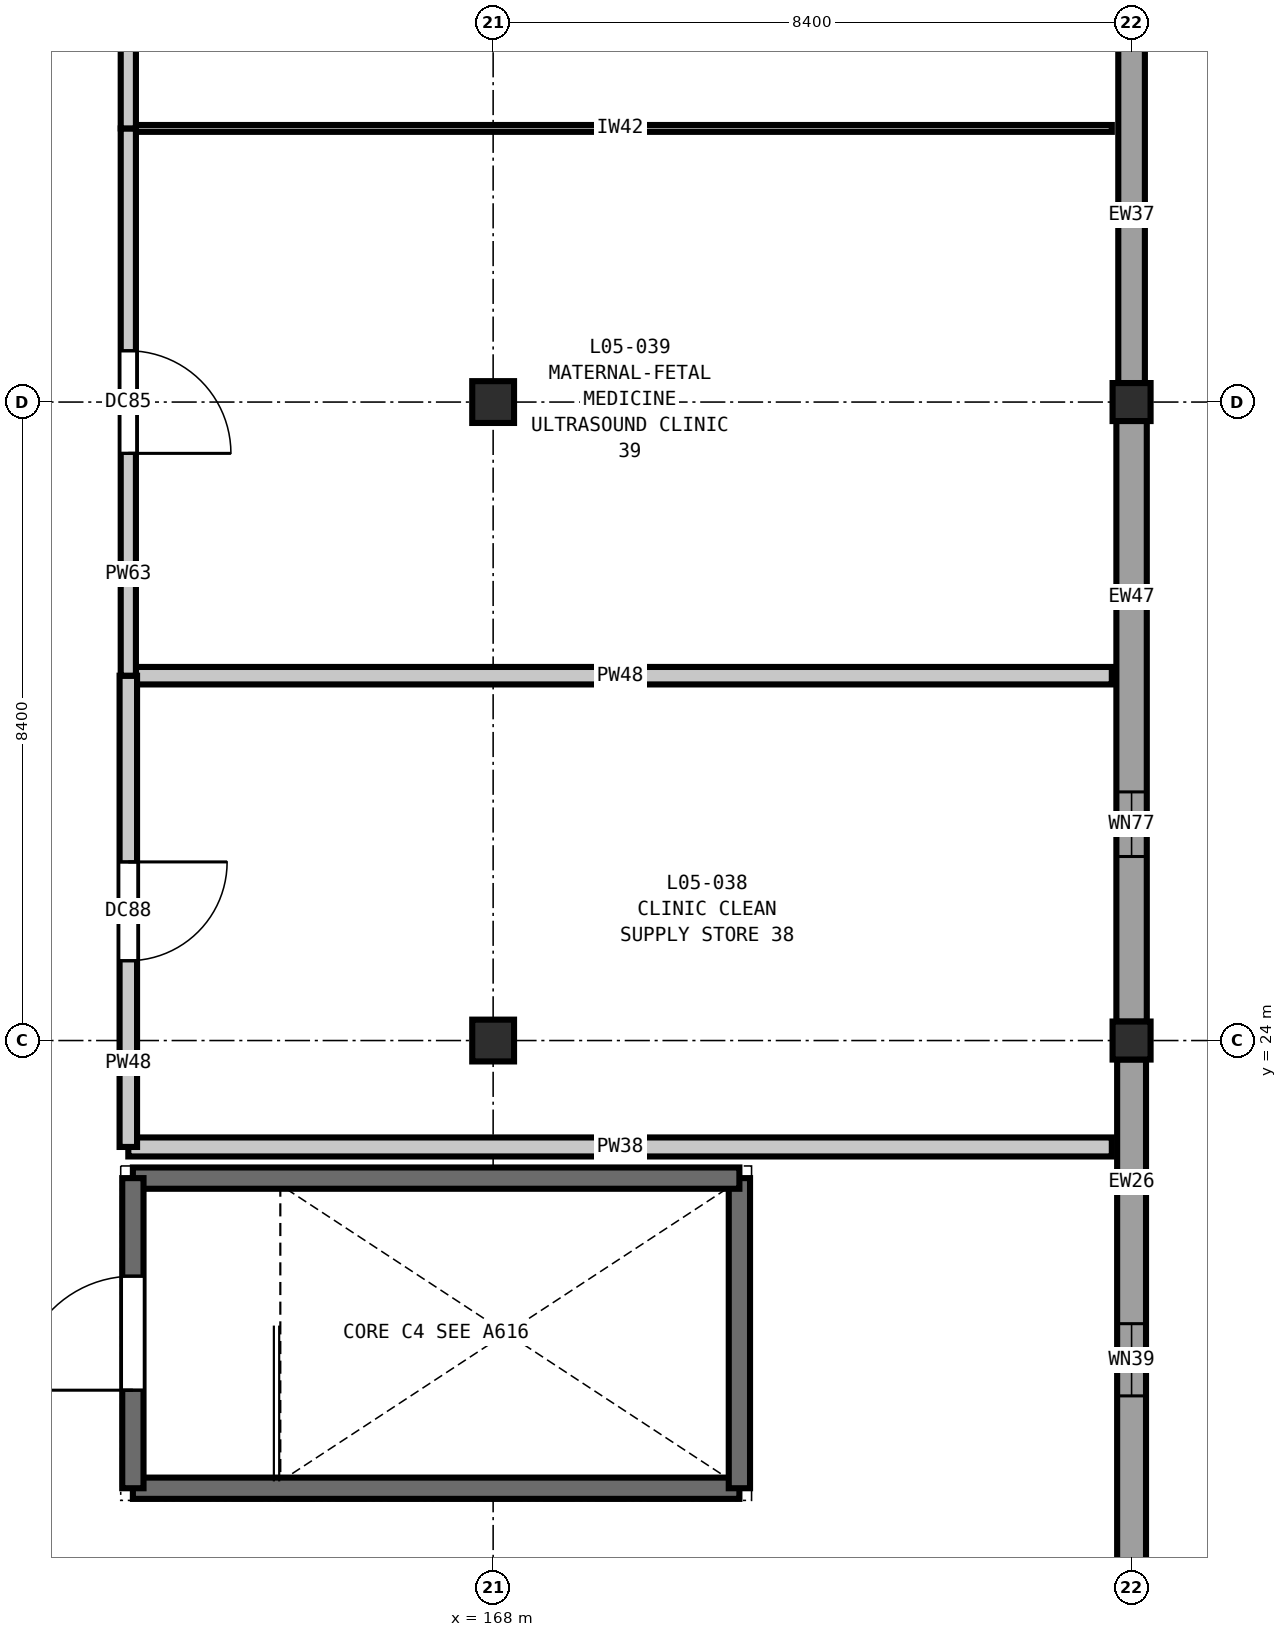
"""IFC4 building model, lengths in metres.
Left out: names, types, materials, properties, quantities, classifications, styles, units other than length and angle.
Written with IfcOpenShell. Run it as: python <this file> out.ifc"""

import sys

from ifc_helpers import new_model, si_unit, direction, frame, frame_2d, origin, origin_2d, place, context, subcontext, project, spatial, rectangle, extrude, element, fill, save


model = new_model("IFC4")
c1 = context("Model", 3, precision=1e-05, world=origin(), true_north=direction((0.0, 1.0)))
c2 = subcontext(c1, "Body", "Model", "MODEL_VIEW")
j1 = project(units=[si_unit("LENGTHUNIT", "METRE"), si_unit("PLANEANGLEUNIT", "RADIAN")], contexts=[c1])
p1 = place(None, origin())
s1 = spatial("IfcSite", under=j1, at=p1, CompositionType="ELEMENT")
p2 = place(p1, origin())
s2 = spatial("IfcBuilding", under=s1, at=p2, CompositionType="ELEMENT")
p3 = place(p2, frame((0.0, 0.0, 24.6)))
s3 = spatial("IfcBuildingStorey", under=s2, at=p3, CompositionType="ELEMENT", Elevation=24.6)
for number, where, z_axis, x_axis in (
    (1, (168.0, 24.0, 0.0), (0.0, 0.0, 1.0), (1.0, 0.0, 0.0)),
    (2, (168.0, 32.4, 0.0), (0.0, 0.0, 1.0), (1.0, 0.0, 0.0)),
):
    element("IfcColumn", number, at=place(p3, frame(where, z_axis=z_axis, x_axis=x_axis)), inside=s3, PredefinedType="COLUMN", context=c2, shape_type="SweptSolid", body=[
        extrude(rectangle(XDim=0.55, YDim=0.55, at=origin_2d()), origin(), (0.0, 0.0, 1.0), 4.2),
    ])
for number, where, z_axis, x_axis in (
    (3, (176.4, 24.0, 0.0), (0.0, 0.0, 1.0), (1.0, 0.0, 0.0)),
    (4, (176.4, 32.4, 0.0), (0.0, 0.0, 1.0), (1.0, 0.0, 0.0)),
):
    element("IfcColumn", number, at=place(p3, frame(where, z_axis=z_axis, x_axis=x_axis)), inside=s3, PredefinedType="COLUMN", context=c2, shape_type="SweptSolid", body=[
        extrude(rectangle(XDim=0.5, YDim=0.5, at=origin_2d()), origin(), (0.0, 0.0, 1.0), 4.2),
    ])
p4 = place(p3, frame((176.4, 40.552, 0.0), z_axis=(0.0, 0.0, 1.0), x_axis=(0.0, -1.0, 0.0)))
e5 = element("IfcWall", 5, at=p4, inside=s3, PredefinedType="SOLIDWALL", context=c2, shape_type="SweptSolid", body=[
    extrude(rectangle(XDim=7.904, YDim=0.35, at=frame_2d((3.952, 0.0))), origin(), (0.0, 0.0, 1.0), 3.48),
])
p5 = place(p4, frame((2.089, 0.0, 0.9)))
e6 = element("IfcOpeningElement", 6, at=p5, cuts=e5, PredefinedType="OPENING", context=c2, shape_type="SweptSolid", body=[
    extrude(rectangle(XDim=1.15, YDim=1.4, at=frame_2d((0.575, 0.7))), frame((0.0, 0.185, 0.0), z_axis=(0.0, -1.0, 0.0), x_axis=(1.0, 0.0, 0.0)), (0.0, 0.0, 1.0), 0.37),
])
p6 = place(p3, frame((176.4, 32.152, 0.0), z_axis=(0.0, 0.0, 1.0), x_axis=(0.0, -1.0, 0.0)))
e7 = element("IfcWall", 7, at=p6, inside=s3, PredefinedType="SOLIDWALL", context=c2, shape_type="SweptSolid", body=[
    extrude(rectangle(XDim=7.904, YDim=0.4, at=frame_2d((3.952, 0.0))), origin(), (0.0, 0.0, 1.0), 3.48),
])
p7 = place(p6, frame((4.881, 0.0, 0.9)))
e8 = element("IfcOpeningElement", 8, at=p7, cuts=e7, PredefinedType="OPENING", context=c2, shape_type="SweptSolid", body=[
    extrude(rectangle(XDim=0.85, YDim=1.4, at=frame_2d((0.425, 0.7))), frame((0.0, 0.21, 0.0), z_axis=(0.0, -1.0, 0.0), x_axis=(1.0, 0.0, 0.0)), (0.0, 0.0, 1.0), 0.42),
])
p8 = place(p3, frame((176.4, 23.752, 0.0), z_axis=(0.0, 0.0, 1.0), x_axis=(0.0, -1.0, 0.0)))
e9 = element("IfcWall", 9, at=p8, inside=s3, PredefinedType="SOLIDWALL", context=c2, shape_type="SweptSolid", body=[
    extrude(rectangle(XDim=7.904, YDim=0.38, at=frame_2d((3.952, 0.0))), origin(), (0.0, 0.0, 1.0), 3.48),
])
p9 = place(p8, frame((3.477, 0.0, 0.9)))
e10 = element("IfcOpeningElement", 10, at=p9, cuts=e9, PredefinedType="OPENING", context=c2, shape_type="SweptSolid", body=[
    extrude(rectangle(XDim=0.95, YDim=1.4, at=frame_2d((0.475, 0.7))), frame((0.0, 0.2, 0.0), z_axis=(0.0, -1.0, 0.0), x_axis=(1.0, 0.0, 0.0)), (0.0, 0.0, 1.0), 0.4),
])
p10 = place(p3, frame((163.26, 18.11, 0.0), z_axis=(0.0, 0.0, 1.0), x_axis=(1.0, 0.0, 0.0)))
e11 = element("IfcWall", 11, at=p10, inside=s3, PredefinedType="SHEAR", context=c2, shape_type="SweptSolid", body=[
    extrude(rectangle(XDim=7.98, YDim=0.28, at=frame_2d((3.99, 0.0))), origin(), (0.0, 0.0, 1.0), 4.2),
])
p11 = place(p3, frame((171.24, 18.11, 0.0), z_axis=(0.0, 0.0, 1.0), x_axis=(0.0, 1.0, 0.0)))
e12 = element("IfcWall", 12, at=p11, inside=s3, PredefinedType="SHEAR", context=c2, shape_type="SweptSolid", body=[
    extrude(rectangle(XDim=4.08, YDim=0.28, at=frame_2d((2.04, 0.0))), origin(), (0.0, 0.0, 1.0), 4.2),
])
p12 = place(p3, frame((171.24, 22.19, 0.0), z_axis=(0.0, 0.0, 1.0), x_axis=(-1.0, 0.0, 0.0)))
e13 = element("IfcWall", 13, at=p12, inside=s3, PredefinedType="SHEAR", context=c2, shape_type="SweptSolid", body=[
    extrude(rectangle(XDim=7.98, YDim=0.28, at=frame_2d((3.99, 0.0))), origin(), (0.0, 0.0, 1.0), 4.2),
])
p13 = place(p3, frame((163.26, 22.19, 0.0), z_axis=(0.0, 0.0, 1.0), x_axis=(0.0, -1.0, 0.0)))
e14 = element("IfcWall", 14, at=p13, inside=s3, PredefinedType="SHEAR", context=c2, shape_type="SweptSolid", body=[
    extrude(rectangle(XDim=4.08, YDim=0.28, at=frame_2d((2.04, 0.0))), origin(), (0.0, 0.0, 1.0), 4.2),
])
p14 = place(p13, frame((1.29, 0.0, 0.0)))
e15 = element("IfcOpeningElement", 15, at=p14, cuts=e14, PredefinedType="OPENING", context=c2, shape_type="SweptSolid", body=[
    extrude(rectangle(XDim=1.5, YDim=2.2, at=frame_2d((0.75, 1.1))), frame((0.0, 0.15, 0.0), z_axis=(0.0, -1.0, 0.0), x_axis=(1.0, 0.0, 0.0)), (0.0, 0.0, 1.0), 0.3),
])
p15 = place(p3, frame((163.2, 22.6, 0.0), z_axis=(0.0, 0.0, 1.0), x_axis=(1.0, 0.0, 0.0)))
e16 = element("IfcWall", 16, at=p15, inside=s3, PredefinedType="PARTITIONING", context=c2, shape_type="SweptSolid", body=[
    extrude(rectangle(XDim=12.94, YDim=0.25, at=frame_2d((6.47, 0.0))), origin(), (0.0, 0.0, 1.0), 3.92),
])
p16 = place(p3, frame((163.2, 28.8, 0.0), z_axis=(0.0, 0.0, 1.0), x_axis=(1.0, 0.0, 0.0)))
e17 = element("IfcWall", 17, at=p16, inside=s3, PredefinedType="PARTITIONING", context=c2, shape_type="SweptSolid", body=[
    extrude(rectangle(XDim=12.94, YDim=0.23, at=frame_2d((6.47, 0.0))), origin(), (0.0, 0.0, 1.0), 3.92),
])
p17 = place(p3, frame((163.2, 36.0, 0.0), z_axis=(0.0, 0.0, 1.0), x_axis=(1.0, 0.0, 0.0)))
e18 = element("IfcWall", 18, at=p17, inside=s3, PredefinedType="PARTITIONING", context=c2, shape_type="SweptSolid", body=[
    extrude(rectangle(XDim=12.94, YDim=0.09, at=frame_2d((6.47, 0.0))), origin(), (0.0, 0.0, 1.0), 3.92),
])
p18 = place(p3, frame((163.2, 22.6, 0.0), z_axis=(0.0, 0.0, 1.0), x_axis=(0.0, 1.0, 0.0)))
e19 = element("IfcWall", 19, at=p18, inside=s3, PredefinedType="PARTITIONING", context=c2, shape_type="SweptSolid", body=[
    extrude(rectangle(XDim=6.2, YDim=0.23, at=frame_2d((3.1, 0.0))), origin(), (0.0, 0.0, 1.0), 3.92),
])
p19 = place(p18, frame((2.45, 0.0, 0.0)))
e20 = element("IfcOpeningElement", 20, at=p19, cuts=e19, PredefinedType="OPENING", context=c2, shape_type="SweptSolid", body=[
    extrude(rectangle(XDim=1.3, YDim=2.2, at=frame_2d((0.65, 1.1))), frame((0.0, 0.125, 0.0), z_axis=(0.0, -1.0, 0.0), x_axis=(1.0, 0.0, 0.0)), (0.0, 0.0, 1.0), 0.25),
])
p20 = place(p3, frame((163.2, 28.8, 0.0), z_axis=(0.0, 0.0, 1.0), x_axis=(0.0, 1.0, 0.0)))
e21 = element("IfcWall", 21, at=p20, inside=s3, PredefinedType="PARTITIONING", context=c2, shape_type="SweptSolid", body=[
    extrude(rectangle(XDim=7.2, YDim=0.2, at=frame_2d((3.6, 0.0))), origin(), (0.0, 0.0, 1.0), 3.92),
])
p21 = place(p20, frame((2.925, 0.0, 0.0)))
e22 = element("IfcOpeningElement", 22, at=p21, cuts=e21, PredefinedType="OPENING", context=c2, shape_type="SweptSolid", body=[
    extrude(rectangle(XDim=1.35, YDim=2.2, at=frame_2d((0.675, 1.1))), frame((0.0, 0.11, 0.0), z_axis=(0.0, -1.0, 0.0), x_axis=(1.0, 0.0, 0.0)), (0.0, 0.0, 1.0), 0.22),
])
p22 = place(p3, frame((163.2, 36.0, 0.0), z_axis=(0.0, 0.0, 1.0), x_axis=(0.0, 1.0, 0.0)))
e23 = element("IfcWall", 23, at=p22, inside=s3, PredefinedType="PARTITIONING", context=c2, shape_type="SweptSolid", body=[
    extrude(rectangle(XDim=5.6, YDim=0.2, at=frame_2d((2.8, 0.0))), origin(), (0.0, 0.0, 1.0), 3.92),
])
p23 = place(p22, frame((2.075, 0.0, 0.0)))
e24 = element("IfcOpeningElement", 24, at=p23, cuts=e23, PredefinedType="OPENING", context=c2, shape_type="SweptSolid", body=[
    extrude(rectangle(XDim=1.45, YDim=2.25, at=frame_2d((0.725, 1.125))), frame((0.0, 0.11, 0.0), z_axis=(0.0, -1.0, 0.0), x_axis=(1.0, 0.0, 0.0)), (0.0, 0.0, 1.0), 0.22),
])
p24 = place(p7, origin())
e25 = element("IfcWindow", 25, at=p24, inside=s3, PartitioningType="SINGLE_PANEL", PredefinedType="WINDOW", context=c2, shape_type="SweptSolid", body=[
    extrude(rectangle(XDim=0.85, YDim=1.4, at=frame_2d((0.425, 0.7))), frame((0.0, 0.03, 0.0), z_axis=(0.0, -1.0, 0.0), x_axis=(1.0, 0.0, 0.0)), (0.0, 0.0, 1.0), 0.06),
])
fill(e8, e25)
p25 = place(p9, origin())
e26 = element("IfcWindow", 26, at=p25, inside=s3, PartitioningType="SINGLE_PANEL", PredefinedType="WINDOW", context=c2, shape_type="SweptSolid", body=[
    extrude(rectangle(XDim=0.95, YDim=1.4, at=frame_2d((0.475, 0.7))), frame((0.0, 0.03, 0.0), z_axis=(0.0, -1.0, 0.0), x_axis=(1.0, 0.0, 0.0)), (0.0, 0.0, 1.0), 0.06),
])
fill(e10, e26)
p26 = place(p14, frame((1.5, 0.0, 0.0), z_axis=(0.0, 0.0, 1.0), x_axis=(-1.0, 0.0, 0.0)))
e27 = element("IfcDoor", 27, at=p26, inside=s3, OperationType="SINGLE_SWING_LEFT", PredefinedType="DOOR", context=c2, shape_type="SweptSolid", body=[
    extrude(rectangle(XDim=1.5, YDim=2.2, at=frame_2d((0.75, 1.1))), frame((0.0, 0.025, 0.0), z_axis=(0.0, -1.0, 0.0), x_axis=(1.0, 0.0, 0.0)), (0.0, 0.0, 1.0), 0.05),
])
fill(e15, e27)
p27 = place(p19, frame((1.3, 0.0, 0.0), z_axis=(0.0, 0.0, 1.0), x_axis=(-1.0, 0.0, 0.0)))
e28 = element("IfcDoor", 28, at=p27, inside=s3, OperationType="SINGLE_SWING_LEFT", PredefinedType="DOOR", context=c2, shape_type="SweptSolid", body=[
    extrude(rectangle(XDim=1.3, YDim=2.2, at=frame_2d((0.65, 1.1))), frame((0.0, 0.025, 0.0), z_axis=(0.0, -1.0, 0.0), x_axis=(1.0, 0.0, 0.0)), (0.0, 0.0, 1.0), 0.05),
])
fill(e20, e28)
p28 = place(p21, frame((1.35, 0.0, 0.0), z_axis=(0.0, 0.0, 1.0), x_axis=(-1.0, 0.0, 0.0)))
e29 = element("IfcDoor", 29, at=p28, inside=s3, OperationType="SINGLE_SWING_RIGHT", PredefinedType="DOOR", context=c2, shape_type="SweptSolid", body=[
    extrude(rectangle(XDim=1.35, YDim=2.2, at=frame_2d((0.675, 1.1))), frame((0.0, 0.025, 0.0), z_axis=(0.0, -1.0, 0.0), x_axis=(1.0, 0.0, 0.0)), (0.0, 0.0, 1.0), 0.05),
])
fill(e22, e29)
save(model, sys.argv[1])
